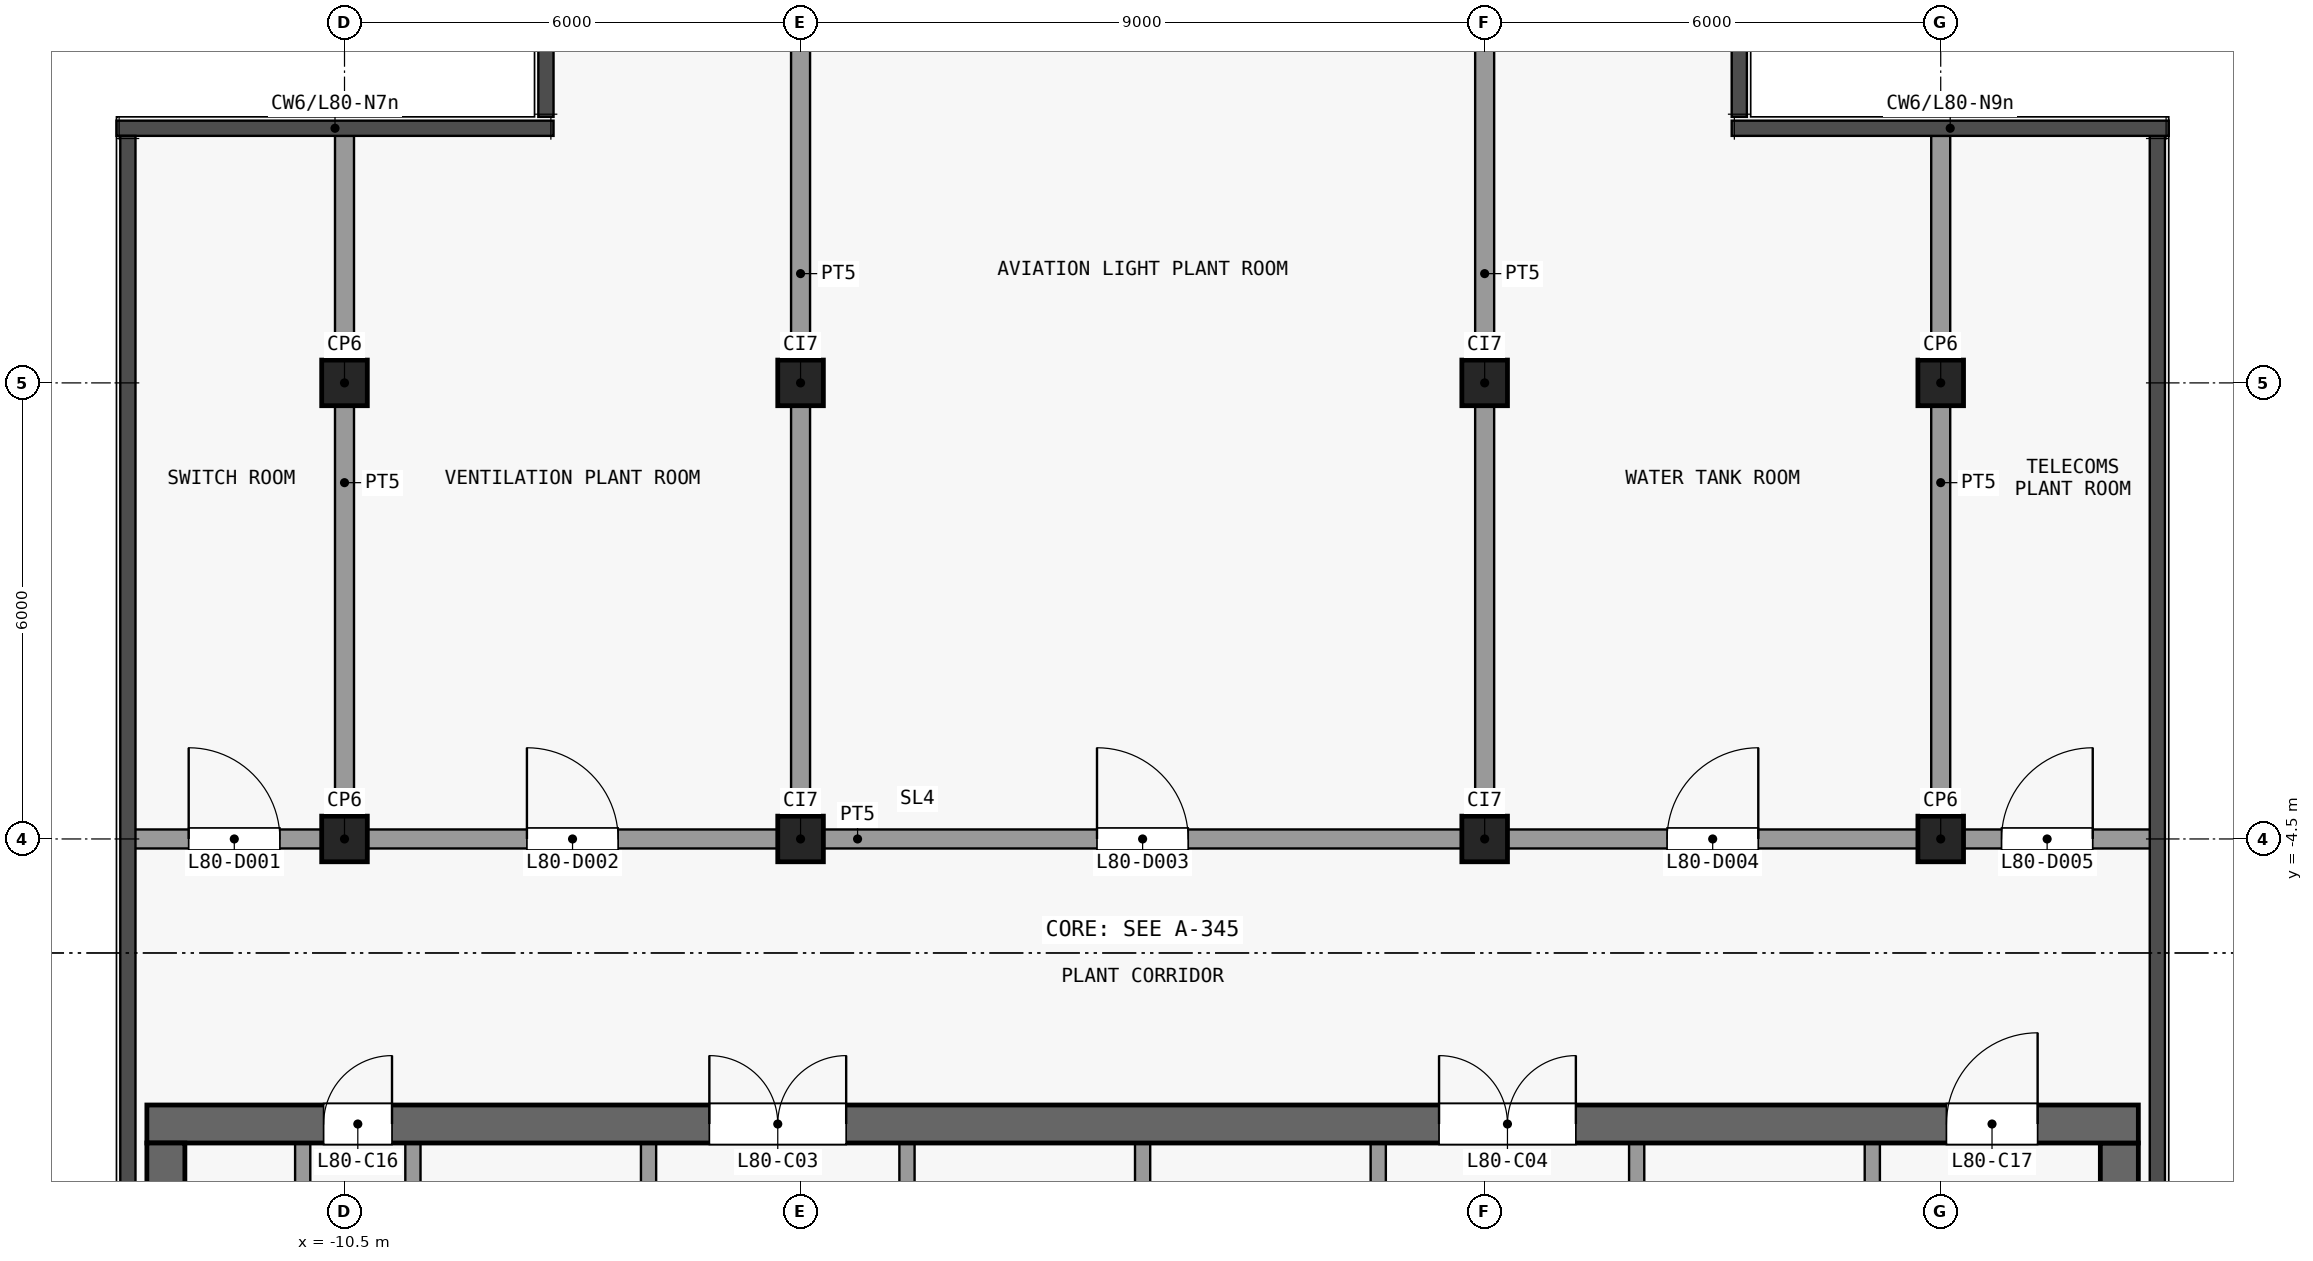
"""IFC4 building model, lengths in metres.
Left out: names, types, materials, properties, quantities, classifications, styles, units other than length and angle.
Written with IfcOpenShell. Run it as: python <this file> out.ifc"""

import sys

from ifc_helpers import new_model, si_unit, direction, frame, frame_2d, origin, origin_2d, place, context, subcontext, project, spatial, rectangle, extrude, element, fill, save


model = new_model("IFC4")
c1 = context("Model", 3, precision=1e-05, world=origin(), true_north=direction((0.0, 1.0)))
c2 = subcontext(c1, "Body", "Model", "MODEL_VIEW")
j1 = project(units=[si_unit("LENGTHUNIT", "METRE"), si_unit("PLANEANGLEUNIT", "RADIAN")], contexts=[c1])
p1 = place(None, origin())
s1 = spatial("IfcSite", under=j1, at=p1, CompositionType="ELEMENT")
p2 = place(p1, origin())
s2 = spatial("IfcBuilding", under=s1, at=p2, CompositionType="ELEMENT")
p3 = place(p2, frame((0.0, 0.0, 316.7)))
s3 = spatial("IfcBuildingStorey", under=s2, at=p3, CompositionType="ELEMENT", Elevation=316.7)
for number, where, z_axis, x_axis in (
    (1, (-10.5, -4.5, 0.0), (0.0, 0.0, 1.0), (1.0, 0.0, 0.0)),
    (2, (-10.5, 1.5, 0.0), (0.0, 0.0, 1.0), (1.0, 0.0, 0.0)),
    (3, (-4.5, -4.5, 0.0), (0.0, 0.0, 1.0), (1.0, 0.0, 0.0)),
    (4, (-4.5, 1.5, 0.0), (0.0, 0.0, 1.0), (1.0, 0.0, 0.0)),
    (5, (4.5, -4.5, 0.0), (0.0, 0.0, 1.0), (1.0, 0.0, 0.0)),
    (6, (4.5, 1.5, 0.0), (0.0, 0.0, 1.0), (1.0, 0.0, 0.0)),
    (7, (10.5, -4.5, 0.0), (0.0, 0.0, 1.0), (1.0, 0.0, 0.0)),
    (8, (10.5, 1.5, 0.0), (0.0, 0.0, 1.0), (1.0, 0.0, 0.0)),
):
    element("IfcColumn", number, at=place(p3, frame(where, z_axis=z_axis, x_axis=x_axis)), inside=s3, PredefinedType="COLUMN", context=c2, shape_type="SweptSolid", body=[
        extrude(rectangle(XDim=0.6, YDim=0.6, at=origin_2d()), origin(), (0.0, 0.0, 1.0), 4.5),
    ])
p4 = place(p3, frame((-13.1, -8.25, 0.0), z_axis=(0.0, 0.0, 1.0), x_axis=(1.0, 0.0, 0.0)))
e9 = element("IfcWall", 9, at=p4, inside=s3, PredefinedType="SHEAR", context=c2, shape_type="SweptSolid", body=[
    extrude(rectangle(XDim=26.2, YDim=0.5, at=frame_2d((13.1, 0.0))), origin(), (0.0, 0.0, 1.0), 4.2),
])
p5 = place(p4, frame((7.4, 0.0, 0.0)))
e10 = element("IfcOpeningElement", 10, at=p5, cuts=e9, PredefinedType="OPENING", context=c2, shape_type="SweptSolid", body=[
    extrude(rectangle(XDim=1.8, YDim=2.1, at=frame_2d((0.9, 1.05))), frame((0.0, 0.26, 0.0), z_axis=(0.0, -1.0, 0.0), x_axis=(1.0, 0.0, 0.0)), (0.0, 0.0, 1.0), 0.52),
])
p6 = place(p4, frame((17.0, 0.0, 0.0)))
e11 = element("IfcOpeningElement", 11, at=p6, cuts=e9, PredefinedType="OPENING", context=c2, shape_type="SweptSolid", body=[
    extrude(rectangle(XDim=1.8, YDim=2.1, at=frame_2d((0.9, 1.05))), frame((0.0, 0.26, 0.0), z_axis=(0.0, -1.0, 0.0), x_axis=(1.0, 0.0, 0.0)), (0.0, 0.0, 1.0), 0.52),
])
p7 = place(p4, frame((2.325, 0.0, 0.0)))
e12 = element("IfcOpeningElement", 12, at=p7, cuts=e9, PredefinedType="OPENING", context=c2, shape_type="SweptSolid", body=[
    extrude(rectangle(XDim=0.9, YDim=2.1, at=frame_2d((0.45, 1.05))), frame((0.0, 0.26, 0.0), z_axis=(0.0, -1.0, 0.0), x_axis=(1.0, 0.0, 0.0)), (0.0, 0.0, 1.0), 0.52),
])
p8 = place(p4, frame((23.675, 0.0, 0.0)))
e13 = element("IfcOpeningElement", 13, at=p8, cuts=e9, PredefinedType="OPENING", context=c2, shape_type="SweptSolid", body=[
    extrude(rectangle(XDim=1.2, YDim=2.1, at=frame_2d((0.6, 1.05))), frame((0.0, 0.26, 0.0), z_axis=(0.0, -1.0, 0.0), x_axis=(1.0, 0.0, 0.0)), (0.0, 0.0, 1.0), 0.52),
])
for number, where, z_axis, x_axis in (
    (14, (-12.85, -24.6, 0.0), (0.0, 0.0, 1.0), (0.0, 1.0, 0.0)),
    (15, (12.85, -24.6, 0.0), (0.0, 0.0, 1.0), (0.0, 1.0, 0.0)),
):
    element("IfcWall", number, at=place(p3, frame(where, z_axis=z_axis, x_axis=x_axis)), inside=s3, PredefinedType="SHEAR", context=c2, shape_type="SweptSolid", body=[
        extrude(rectangle(XDim=16.1, YDim=0.5, at=frame_2d((8.05, 0.0))), origin(), (0.0, 0.0, 1.0), 4.2),
    ])
p9 = place(p3, frame((-11.05, -12.1, 0.0), z_axis=(0.0, 0.0, 1.0), x_axis=(0.0, 1.0, 0.0)))
e16 = element("IfcWall", 16, at=p9, inside=s3, PredefinedType="PARTITIONING", context=c2, shape_type="SweptSolid", body=[
    extrude(rectangle(XDim=3.6, YDim=0.2, at=frame_2d((1.8, 0.0))), origin(), (0.0, 0.0, 1.0), 4.2),
])
p10 = place(p9, frame((1.4, 0.0, 0.0)))
e17 = element("IfcOpeningElement", 17, at=p10, cuts=e16, PredefinedType="OPENING", context=c2, shape_type="SweptSolid", body=[
    extrude(rectangle(XDim=0.9, YDim=2.1, at=frame_2d((0.45, 1.05))), frame((0.0, 0.11, 0.0), z_axis=(0.0, -1.0, 0.0), x_axis=(1.0, 0.0, 0.0)), (0.0, 0.0, 1.0), 0.22),
])
p11 = place(p3, frame((-9.6, -16.9, 0.0), z_axis=(0.0, 0.0, 1.0), x_axis=(0.0, 1.0, 0.0)))
e18 = element("IfcWall", 18, at=p11, inside=s3, PredefinedType="PARTITIONING", context=c2, shape_type="SweptSolid", body=[
    extrude(rectangle(XDim=8.4, YDim=0.2, at=frame_2d((4.2, 0.0))), origin(), (0.0, 0.0, 1.0), 4.2),
])
p12 = place(p3, frame((-6.5, -22.5, 0.0), z_axis=(0.0, 0.0, 1.0), x_axis=(0.0, 1.0, 0.0)))
e19 = element("IfcWall", 19, at=p12, inside=s3, PredefinedType="PARTITIONING", context=c2, shape_type="SweptSolid", body=[
    extrude(rectangle(XDim=14.0, YDim=0.2, at=frame_2d((7.0, 0.0))), origin(), (0.0, 0.0, 1.0), 4.2),
])
p13 = place(p12, frame((1.04, 0.0, 0.0)))
e20 = element("IfcOpeningElement", 20, at=p13, cuts=e19, PredefinedType="OPENING", context=c2, shape_type="SweptSolid", body=[
    extrude(rectangle(XDim=0.9, YDim=2.1, at=frame_2d((0.45, 1.05))), frame((0.0, 0.11, 0.0), z_axis=(0.0, -1.0, 0.0), x_axis=(1.0, 0.0, 0.0)), (0.0, 0.0, 1.0), 0.22),
])
p14 = place(p12, frame((5.06, 0.0, 0.0)))
e21 = element("IfcOpeningElement", 21, at=p14, cuts=e19, PredefinedType="OPENING", context=c2, shape_type="SweptSolid", body=[
    extrude(rectangle(XDim=1.2, YDim=2.1, at=frame_2d((0.6, 1.05))), frame((0.0, 0.11, 0.0), z_axis=(0.0, -1.0, 0.0), x_axis=(1.0, 0.0, 0.0)), (0.0, 0.0, 1.0), 0.22),
])
p15 = place(p12, frame((10.62, 0.0, 0.0)))
e22 = element("IfcOpeningElement", 22, at=p15, cuts=e19, PredefinedType="OPENING", context=c2, shape_type="SweptSolid", body=[
    extrude(rectangle(XDim=1.2, YDim=2.1, at=frame_2d((0.6, 1.05))), frame((0.0, 0.11, 0.0), z_axis=(0.0, -1.0, 0.0), x_axis=(1.0, 0.0, 0.0)), (0.0, 0.0, 1.0), 0.22),
])
p16 = place(p3, frame((-3.1, -8.5, 0.0), z_axis=(0.0, 0.0, 1.0), x_axis=(0.0, -1.0, 0.0)))
e23 = element("IfcWall", 23, at=p16, inside=s3, PredefinedType="PARTITIONING", context=c2, shape_type="SweptSolid", body=[
    extrude(rectangle(XDim=10.97, YDim=0.2, at=frame_2d((5.485, 0.0))), origin(), (0.0, 0.0, 1.0), 4.2),
])
p17 = place(p16, frame((6.35, 0.0, 0.0)))
e24 = element("IfcOpeningElement", 24, at=p17, cuts=e23, PredefinedType="OPENING", context=c2, shape_type="SweptSolid", body=[
    extrude(rectangle(XDim=1.2, YDim=2.1, at=frame_2d((0.6, 1.05))), frame((0.0, 0.11, 0.0), z_axis=(0.0, -1.0, 0.0), x_axis=(1.0, 0.0, 0.0)), (0.0, 0.0, 1.0), 0.22),
])
p18 = place(p16, frame((0.94, 0.0, 0.0)))
e25 = element("IfcOpeningElement", 25, at=p18, cuts=e23, PredefinedType="OPENING", context=c2, shape_type="SweptSolid", body=[
    extrude(rectangle(XDim=0.9, YDim=2.1, at=frame_2d((0.45, 1.05))), frame((0.0, 0.11, 0.0), z_axis=(0.0, -1.0, 0.0), x_axis=(1.0, 0.0, 0.0)), (0.0, 0.0, 1.0), 0.22),
])
p19 = place(p3, frame((0.0, -19.35, 0.0), z_axis=(0.0, 0.0, 1.0), x_axis=(0.0, 1.0, 0.0)))
e26 = element("IfcWall", 26, at=p19, inside=s3, PredefinedType="PARTITIONING", context=c2, shape_type="SweptSolid", body=[
    extrude(rectangle(XDim=10.85, YDim=0.2, at=frame_2d((5.425, 0.0))), origin(), (0.0, 0.0, 1.0), 4.2),
])
p20 = place(p3, frame((3.1, -19.6, 0.0), z_axis=(0.0, 0.0, 1.0), x_axis=(0.0, 1.0, 0.0)))
e27 = element("IfcWall", 27, at=p20, inside=s3, PredefinedType="PARTITIONING", context=c2, shape_type="SweptSolid", body=[
    extrude(rectangle(XDim=11.1, YDim=0.2, at=frame_2d((5.55, 0.0))), origin(), (0.0, 0.0, 1.0), 4.2),
])
p21 = place(p20, frame((1.025, 0.0, 0.0)))
e28 = element("IfcOpeningElement", 28, at=p21, cuts=e27, PredefinedType="OPENING", context=c2, shape_type="SweptSolid", body=[
    extrude(rectangle(XDim=0.9, YDim=2.1, at=frame_2d((0.45, 1.05))), frame((0.0, 0.11, 0.0), z_axis=(0.0, -1.0, 0.0), x_axis=(1.0, 0.0, 0.0)), (0.0, 0.0, 1.0), 0.22),
])
p22 = place(p20, frame((6.375, 0.0, 0.0)))
e29 = element("IfcOpeningElement", 29, at=p22, cuts=e27, PredefinedType="OPENING", context=c2, shape_type="SweptSolid", body=[
    extrude(rectangle(XDim=1.2, YDim=2.1, at=frame_2d((0.6, 1.05))), frame((0.0, 0.11, 0.0), z_axis=(0.0, -1.0, 0.0), x_axis=(1.0, 0.0, 0.0)), (0.0, 0.0, 1.0), 0.22),
])
p23 = place(p3, frame((6.5, -8.5, 0.0), z_axis=(0.0, 0.0, 1.0), x_axis=(0.0, -1.0, 0.0)))
e30 = element("IfcWall", 30, at=p23, inside=s3, PredefinedType="PARTITIONING", context=c2, shape_type="SweptSolid", body=[
    extrude(rectangle(XDim=10.85, YDim=0.2, at=frame_2d((5.425, 0.0))), origin(), (0.0, 0.0, 1.0), 4.2),
])
p24 = place(p23, frame((7.65, 0.0, 0.0)))
e31 = element("IfcOpeningElement", 31, at=p24, cuts=e30, PredefinedType="OPENING", context=c2, shape_type="SweptSolid", body=[
    extrude(rectangle(XDim=1.2, YDim=2.1, at=frame_2d((0.6, 1.05))), frame((0.0, 0.11, 0.0), z_axis=(0.0, -1.0, 0.0), x_axis=(1.0, 0.0, 0.0)), (0.0, 0.0, 1.0), 0.22),
])
p25 = place(p23, frame((2.15, 0.0, 0.0)))
e32 = element("IfcOpeningElement", 32, at=p25, cuts=e30, PredefinedType="OPENING", context=c2, shape_type="SweptSolid", body=[
    extrude(rectangle(XDim=1.2, YDim=2.1, at=frame_2d((0.6, 1.05))), frame((0.0, 0.11, 0.0), z_axis=(0.0, -1.0, 0.0), x_axis=(1.0, 0.0, 0.0)), (0.0, 0.0, 1.0), 0.22),
])
p26 = place(p3, frame((9.6, -16.9, 0.0), z_axis=(0.0, 0.0, 1.0), x_axis=(0.0, 1.0, 0.0)))
e33 = element("IfcWall", 33, at=p26, inside=s3, PredefinedType="PARTITIONING", context=c2, shape_type="SweptSolid", body=[
    extrude(rectangle(XDim=8.4, YDim=0.2, at=frame_2d((4.2, 0.0))), origin(), (0.0, 0.0, 1.0), 4.2),
])
p27 = place(p3, frame((-13.35, -4.5, 0.0), z_axis=(0.0, 0.0, 1.0), x_axis=(1.0, 0.0, 0.0)))
e34 = element("IfcWall", 34, at=p27, inside=s3, PredefinedType="PARTITIONING", context=c2, shape_type="SweptSolid", body=[
    extrude(rectangle(XDim=26.7, YDim=0.25, at=frame_2d((13.35, 0.0))), origin(), (0.0, 0.0, 1.0), 4.2),
])
p28 = place(p27, frame((0.8, 0.0, 0.0)))
e35 = element("IfcOpeningElement", 35, at=p28, cuts=e34, PredefinedType="OPENING", context=c2, shape_type="SweptSolid", body=[
    extrude(rectangle(XDim=1.2, YDim=2.1, at=frame_2d((0.6, 1.05))), frame((0.0, 0.135, 0.0), z_axis=(0.0, -1.0, 0.0), x_axis=(1.0, 0.0, 0.0)), (0.0, 0.0, 1.0), 0.27),
])
p29 = place(p27, frame((5.25, 0.0, 0.0)))
e36 = element("IfcOpeningElement", 36, at=p29, cuts=e34, PredefinedType="OPENING", context=c2, shape_type="SweptSolid", body=[
    extrude(rectangle(XDim=1.2, YDim=2.1, at=frame_2d((0.6, 1.05))), frame((0.0, 0.135, 0.0), z_axis=(0.0, -1.0, 0.0), x_axis=(1.0, 0.0, 0.0)), (0.0, 0.0, 1.0), 0.27),
])
p30 = place(p27, frame((12.75, 0.0, 0.0)))
e37 = element("IfcOpeningElement", 37, at=p30, cuts=e34, PredefinedType="OPENING", context=c2, shape_type="SweptSolid", body=[
    extrude(rectangle(XDim=1.2, YDim=2.1, at=frame_2d((0.6, 1.05))), frame((0.0, 0.135, 0.0), z_axis=(0.0, -1.0, 0.0), x_axis=(1.0, 0.0, 0.0)), (0.0, 0.0, 1.0), 0.27),
])
p31 = place(p27, frame((20.25, 0.0, 0.0)))
e38 = element("IfcOpeningElement", 38, at=p31, cuts=e34, PredefinedType="OPENING", context=c2, shape_type="SweptSolid", body=[
    extrude(rectangle(XDim=1.2, YDim=2.1, at=frame_2d((0.6, 1.05))), frame((0.0, 0.135, 0.0), z_axis=(0.0, -1.0, 0.0), x_axis=(1.0, 0.0, 0.0)), (0.0, 0.0, 1.0), 0.27),
])
p32 = place(p27, frame((24.65, 0.0, 0.0)))
e39 = element("IfcOpeningElement", 39, at=p32, cuts=e34, PredefinedType="OPENING", context=c2, shape_type="SweptSolid", body=[
    extrude(rectangle(XDim=1.2, YDim=2.1, at=frame_2d((0.6, 1.05))), frame((0.0, 0.135, 0.0), z_axis=(0.0, -1.0, 0.0), x_axis=(1.0, 0.0, 0.0)), (0.0, 0.0, 1.0), 0.27),
])
p33 = place(p3, frame((-10.5, -4.375, 0.0), z_axis=(0.0, 0.0, 1.0), x_axis=(0.0, 1.0, 0.0)))
e40 = element("IfcWall", 40, at=p33, inside=s3, PredefinedType="PARTITIONING", context=c2, shape_type="SweptSolid", body=[
    extrude(rectangle(XDim=9.125, YDim=0.25, at=frame_2d((4.562, 0.0))), origin(), (0.0, 0.0, 1.0), 4.2),
])
for number, where, z_axis, x_axis in (
    (41, (-4.5, -4.375, 0.0), (0.0, 0.0, 1.0), (0.0, 1.0, 0.0)),
    (42, (4.5, -4.375, 0.0), (0.0, 0.0, 1.0), (0.0, 1.0, 0.0)),
):
    element("IfcWall", number, at=place(p3, frame(where, z_axis=z_axis, x_axis=x_axis)), inside=s3, PredefinedType="PARTITIONING", context=c2, shape_type="SweptSolid", body=[
        extrude(rectangle(XDim=14.625, YDim=0.25, at=frame_2d((7.312, 0.0))), origin(), (0.0, 0.0, 1.0), 4.2),
    ])
p34 = place(p3, frame((10.5, -4.375, 0.0), z_axis=(0.0, 0.0, 1.0), x_axis=(0.0, 1.0, 0.0)))
e43 = element("IfcWall", 43, at=p34, inside=s3, PredefinedType="PARTITIONING", context=c2, shape_type="SweptSolid", body=[
    extrude(rectangle(XDim=9.125, YDim=0.25, at=frame_2d((4.562, 0.0))), origin(), (0.0, 0.0, 1.0), 4.2),
])
p35 = place(p5, origin())
e44 = element("IfcDoor", 44, at=p35, inside=s3, OperationType="DOUBLE_DOOR_SINGLE_SWING", PredefinedType="DOOR", context=c2, shape_type="SweptSolid", body=[
    extrude(rectangle(XDim=1.8, YDim=2.1, at=frame_2d((0.9, 1.05))), frame((0.0, 0.025, 0.0), z_axis=(0.0, -1.0, 0.0), x_axis=(1.0, 0.0, 0.0)), (0.0, 0.0, 1.0), 0.05),
])
fill(e10, e44)
p36 = place(p6, origin())
e45 = element("IfcDoor", 45, at=p36, inside=s3, OperationType="DOUBLE_DOOR_SINGLE_SWING", PredefinedType="DOOR", context=c2, shape_type="SweptSolid", body=[
    extrude(rectangle(XDim=1.8, YDim=2.1, at=frame_2d((0.9, 1.05))), frame((0.0, 0.025, 0.0), z_axis=(0.0, -1.0, 0.0), x_axis=(1.0, 0.0, 0.0)), (0.0, 0.0, 1.0), 0.05),
])
fill(e11, e45)
p37 = place(p7, origin())
e46 = element("IfcDoor", 46, at=p37, inside=s3, OperationType="SINGLE_SWING_RIGHT", PredefinedType="DOOR", context=c2, shape_type="SweptSolid", body=[
    extrude(rectangle(XDim=0.9, YDim=2.1, at=frame_2d((0.45, 1.05))), frame((0.0, 0.025, 0.0), z_axis=(0.0, -1.0, 0.0), x_axis=(1.0, 0.0, 0.0)), (0.0, 0.0, 1.0), 0.05),
])
fill(e12, e46)
p38 = place(p8, origin())
e47 = element("IfcDoor", 47, at=p38, inside=s3, OperationType="SINGLE_SWING_RIGHT", PredefinedType="DOOR", context=c2, shape_type="SweptSolid", body=[
    extrude(rectangle(XDim=1.2, YDim=2.1, at=frame_2d((0.6, 1.05))), frame((0.0, 0.025, 0.0), z_axis=(0.0, -1.0, 0.0), x_axis=(1.0, 0.0, 0.0)), (0.0, 0.0, 1.0), 0.05),
])
fill(e13, e47)
p39 = place(p28, origin())
e48 = element("IfcDoor", 48, at=p39, inside=s3, OperationType="SINGLE_SWING_RIGHT", PredefinedType="DOOR", context=c2, shape_type="SweptSolid", body=[
    extrude(rectangle(XDim=1.2, YDim=2.1, at=frame_2d((0.6, 1.05))), frame((0.0, 0.025, 0.0), z_axis=(0.0, -1.0, 0.0), x_axis=(1.0, 0.0, 0.0)), (0.0, 0.0, 1.0), 0.05),
])
fill(e35, e48)
p40 = place(p29, origin())
e49 = element("IfcDoor", 49, at=p40, inside=s3, OperationType="SINGLE_SWING_RIGHT", PredefinedType="DOOR", context=c2, shape_type="SweptSolid", body=[
    extrude(rectangle(XDim=1.2, YDim=2.1, at=frame_2d((0.6, 1.05))), frame((0.0, 0.025, 0.0), z_axis=(0.0, -1.0, 0.0), x_axis=(1.0, 0.0, 0.0)), (0.0, 0.0, 1.0), 0.05),
])
fill(e36, e49)
p41 = place(p30, origin())
e50 = element("IfcDoor", 50, at=p41, inside=s3, OperationType="SINGLE_SWING_RIGHT", PredefinedType="DOOR", context=c2, shape_type="SweptSolid", body=[
    extrude(rectangle(XDim=1.2, YDim=2.1, at=frame_2d((0.6, 1.05))), frame((0.0, 0.025, 0.0), z_axis=(0.0, -1.0, 0.0), x_axis=(1.0, 0.0, 0.0)), (0.0, 0.0, 1.0), 0.05),
])
fill(e37, e50)
p42 = place(p31, origin())
e51 = element("IfcDoor", 51, at=p42, inside=s3, OperationType="SINGLE_SWING_LEFT", PredefinedType="DOOR", context=c2, shape_type="SweptSolid", body=[
    extrude(rectangle(XDim=1.2, YDim=2.1, at=frame_2d((0.6, 1.05))), frame((0.0, 0.025, 0.0), z_axis=(0.0, -1.0, 0.0), x_axis=(1.0, 0.0, 0.0)), (0.0, 0.0, 1.0), 0.05),
])
fill(e38, e51)
p43 = place(p32, origin())
e52 = element("IfcDoor", 52, at=p43, inside=s3, OperationType="SINGLE_SWING_LEFT", PredefinedType="DOOR", context=c2, shape_type="SweptSolid", body=[
    extrude(rectangle(XDim=1.2, YDim=2.1, at=frame_2d((0.6, 1.05))), frame((0.0, 0.025, 0.0), z_axis=(0.0, -1.0, 0.0), x_axis=(1.0, 0.0, 0.0)), (0.0, 0.0, 1.0), 0.05),
])
fill(e39, e52)
save(model, sys.argv[1])
